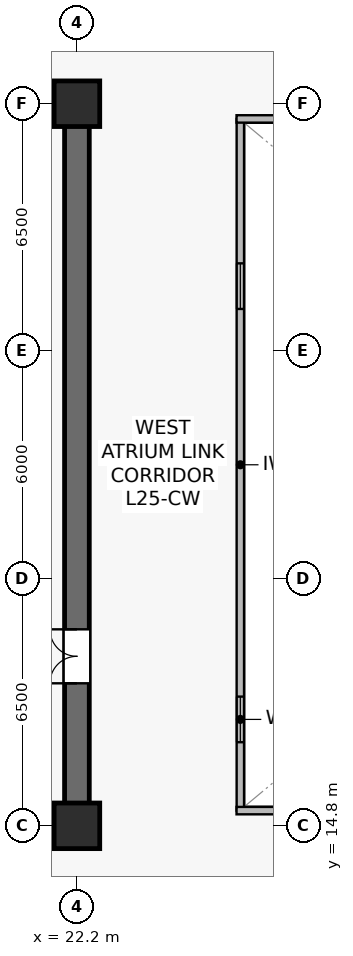
"""IFC4 building model, lengths in metres.
Left out: names, types, materials, properties, quantities, classifications, styles, units other than length and angle.
Written with IfcOpenShell. Run it as: python <this file> out.ifc"""

import sys

from ifc_helpers import new_model, si_unit, direction, frame, frame_2d, origin, origin_2d, place, context, subcontext, project, spatial, rectangle, extrude, source, transform, mapped, element, fill, save


model = new_model("IFC4")
c1 = context("Model", 3, precision=1e-05, world=origin(), true_north=direction((0.0, 1.0)))
c2 = subcontext(c1, "Body", "Model", "MODEL_VIEW")
j1 = project(units=[si_unit("LENGTHUNIT", "METRE"), si_unit("PLANEANGLEUNIT", "RADIAN")], contexts=[c1])
p1 = place(None, origin())
s1 = spatial("IfcSite", under=j1, at=p1, CompositionType="ELEMENT")
p2 = place(p1, origin())
s2 = spatial("IfcBuilding", under=s1, at=p2, CompositionType="ELEMENT")
p3 = place(p2, frame((0.0, 0.0, 105.1)))
s3 = spatial("IfcBuildingStorey", under=s2, at=p3, CompositionType="ELEMENT", Elevation=105.1)
p4 = place(p3, frame((7.075, 14.8, 0.0), z_axis=(0.0, 0.0, 1.0), x_axis=(1.0, 0.0, 0.0)))
e1 = element("IfcWall", 1, at=p4, inside=s3, PredefinedType="SHEAR", context=c2, shape_type="SweptSolid", body=[
    extrude(rectangle(XDim=15.45, YDim=0.65, at=frame_2d((7.725, 0.0))), origin(), (0.0, 0.0, 1.0), 3.79),
])
p5 = place(p3, frame((7.075, 33.8, 0.0), z_axis=(0.0, 0.0, 1.0), x_axis=(1.0, 0.0, 0.0)))
e2 = element("IfcWall", 2, at=p5, inside=s3, PredefinedType="SHEAR", context=c2, shape_type="SweptSolid", body=[
    extrude(rectangle(XDim=15.45, YDim=0.65, at=frame_2d((7.725, 0.0))), origin(), (0.0, 0.0, 1.0), 3.79),
])
p6 = place(p5, frame((5.25, 0.0, 0.0)))
e3 = element("IfcOpeningElement", 3, at=p6, cuts=e2, PredefinedType="OPENING", context=c2, shape_type="SweptSolid", body=[
    extrude(rectangle(XDim=0.95, YDim=2.15, at=frame_2d((0.475, 1.075))), frame((0.0, 0.335, 0.0), z_axis=(0.0, -1.0, 0.0), x_axis=(1.0, 0.0, 0.0)), (0.0, 0.0, 1.0), 0.67),
])
p7 = place(p5, frame((7.765, 0.0, 0.0)))
e4 = element("IfcOpeningElement", 4, at=p7, cuts=e2, PredefinedType="OPENING", context=c2, shape_type="SweptSolid", body=[
    extrude(rectangle(XDim=0.95, YDim=2.15, at=frame_2d((0.475, 1.075))), frame((0.0, 0.335, 0.0), z_axis=(0.0, -1.0, 0.0), x_axis=(1.0, 0.0, 0.0)), (0.0, 0.0, 1.0), 0.67),
])
p8 = place(p5, frame((10.315, 0.0, 0.0)))
e5 = element("IfcOpeningElement", 5, at=p8, cuts=e2, PredefinedType="OPENING", context=c2, shape_type="SweptSolid", body=[
    extrude(rectangle(XDim=0.95, YDim=2.15, at=frame_2d((0.475, 1.075))), frame((0.0, 0.335, 0.0), z_axis=(0.0, -1.0, 0.0), x_axis=(1.0, 0.0, 0.0)), (0.0, 0.0, 1.0), 0.67),
])
p9 = place(p5, frame((12.865, 0.0, 0.0)))
e6 = element("IfcOpeningElement", 6, at=p9, cuts=e2, PredefinedType="OPENING", context=c2, shape_type="SweptSolid", body=[
    extrude(rectangle(XDim=0.95, YDim=2.15, at=frame_2d((0.475, 1.075))), frame((0.0, 0.335, 0.0), z_axis=(0.0, -1.0, 0.0), x_axis=(1.0, 0.0, 0.0)), (0.0, 0.0, 1.0), 0.67),
])
p10 = place(p3, frame((22.2, 15.125, 0.0), z_axis=(0.0, 0.0, 1.0), x_axis=(0.0, 1.0, 0.0)))
e7 = element("IfcWall", 7, at=p10, inside=s3, PredefinedType="SHEAR", context=c2, shape_type="SweptSolid", body=[
    extrude(rectangle(XDim=18.35, YDim=0.65, at=frame_2d((9.175, 0.0))), origin(), (0.0, 0.0, 1.0), 3.79),
])
p11 = place(p10, frame((3.425, 0.0, 0.0)))
e8 = element("IfcOpeningElement", 8, at=p11, cuts=e7, PredefinedType="OPENING", context=c2, shape_type="SweptSolid", body=[
    extrude(rectangle(XDim=1.42, YDim=2.2, at=frame_2d((0.71, 1.1))), frame((0.0, 0.335, 0.0), z_axis=(0.0, -1.0, 0.0), x_axis=(1.0, 0.0, 0.0)), (0.0, 0.0, 1.0), 0.67),
])
m1 = source(origin(), c2, "Body", "SweptSolid", [
    extrude(rectangle(XDim=1.2, YDim=1.2, at=origin_2d()), origin(), (0.0, 0.0, 1.0), 4.1),
])
for number, where, z_axis, x_axis in (
    (9, (22.2, 14.8, 0.0), (0.0, 0.0, 1.0), (1.0, 0.0, 0.0)),
    (10, (22.2, 33.8, 0.0), (0.0, 0.0, 1.0), (1.0, 0.0, 0.0)),
):
    element("IfcColumn", number, at=place(p3, frame(where, z_axis=z_axis, x_axis=x_axis)), inside=s3, PredefinedType="COLUMN", context=c2, shape_type="MappedRepresentation", body=[
        mapped(m1, transform((0.0, 0.0, 0.0), scale=1.0)),
    ])
p12 = place(p3, frame((26.5, 15.2, 0.0), z_axis=(0.0, 0.0, 1.0), x_axis=(0.0, 1.0, 0.0)))
e11 = element("IfcWall", 11, at=p12, inside=s3, PredefinedType="SOLIDWALL", context=c2, shape_type="SweptSolid", body=[
    extrude(rectangle(XDim=18.2, YDim=0.195, at=frame_2d((9.1, 0.0))), origin(), (0.0, 0.0, 1.0), 3.79),
])
p13 = place(p12, frame((1.8, 0.0, 0.9)))
e12 = element("IfcOpeningElement", 12, at=p13, cuts=e11, PredefinedType="OPENING", context=c2, shape_type="SweptSolid", body=[
    extrude(rectangle(XDim=1.2, YDim=1.35, at=frame_2d((0.6, 0.675))), frame((0.0, 0.107, 0.0), z_axis=(0.0, -1.0, 0.0), x_axis=(1.0, 0.0, 0.0)), (0.0, 0.0, 1.0), 0.215),
])
p14 = place(p12, frame((13.2, 0.0, 0.9)))
e13 = element("IfcOpeningElement", 13, at=p14, cuts=e11, PredefinedType="OPENING", context=c2, shape_type="SweptSolid", body=[
    extrude(rectangle(XDim=1.2, YDim=1.35, at=frame_2d((0.6, 0.675))), frame((0.0, 0.107, 0.0), z_axis=(0.0, -1.0, 0.0), x_axis=(1.0, 0.0, 0.0)), (0.0, 0.0, 1.0), 0.215),
])
for number, where, z_axis, x_axis in (
    (14, (26.4, 15.2, 0.0), (0.0, 0.0, 1.0), (1.0, 0.0, 0.0)),
    (15, (26.4, 33.4, 0.0), (0.0, 0.0, 1.0), (1.0, 0.0, 0.0)),
):
    element("IfcWall", number, at=place(p3, frame(where, z_axis=z_axis, x_axis=x_axis)), inside=s3, PredefinedType="SOLIDWALL", context=c2, shape_type="SweptSolid", body=[
        extrude(rectangle(XDim=22.0, YDim=0.195, at=frame_2d((11.0, 0.0))), origin(), (0.0, 0.0, 1.0), 3.79),
    ])
m2 = source(origin(), c2, "Body", "SweptSolid", [
    extrude(rectangle(XDim=1.2, YDim=1.35, at=frame_2d((0.6, 0.675))), frame((0.0, 0.03, 0.0), z_axis=(0.0, -1.0, 0.0), x_axis=(1.0, 0.0, 0.0)), (0.0, 0.0, 1.0), 0.06),
])
p15 = place(p13, origin())
e16 = element("IfcWindow", 16, at=p15, inside=s3, PartitioningType="SINGLE_PANEL", PredefinedType="WINDOW", context=c2, shape_type="MappedRepresentation", body=[
    mapped(m2, transform((0.0, 0.0, 0.0), scale=1.0)),
])
fill(e12, e16)
p16 = place(p14, origin())
e17 = element("IfcWindow", 17, at=p16, inside=s3, PartitioningType="SINGLE_PANEL", PredefinedType="WINDOW", context=c2, shape_type="MappedRepresentation", body=[
    mapped(m2, transform((0.0, 0.0, 0.0), scale=1.0)),
])
fill(e13, e17)
m3 = source(origin(), c2, "Body", "SweptSolid", [
    extrude(rectangle(XDim=1.42, YDim=2.2, at=frame_2d((0.71, 1.1))), frame((0.0, 0.025, 0.0), z_axis=(0.0, -1.0, 0.0), x_axis=(1.0, 0.0, 0.0)), (0.0, 0.0, 1.0), 0.05),
])
p17 = place(p11, origin())
e18 = element("IfcDoor", 18, at=p17, inside=s3, OperationType="DOUBLE_DOOR_SINGLE_SWING", PredefinedType="DOOR", context=c2, shape_type="MappedRepresentation", body=[
    mapped(m3, transform((0.0, 0.0, 0.0), scale=1.0)),
])
fill(e8, e18)
save(model, sys.argv[1])
